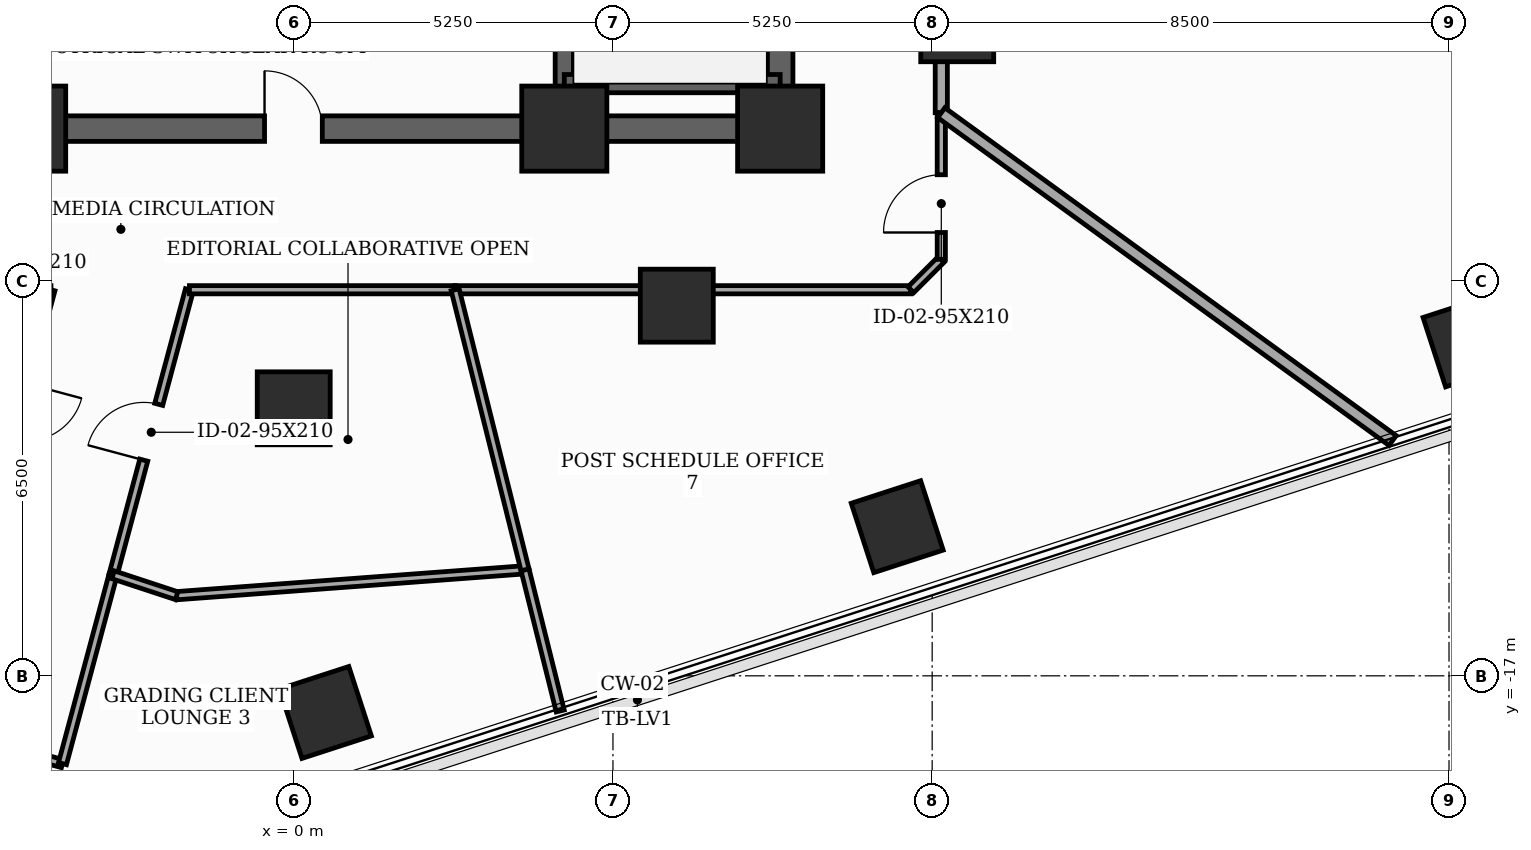
"""IFC4 building model, lengths in metres.
Left out: names, types, materials, properties, quantities, classifications, styles, units other than length and angle.
Written with IfcOpenShell. Run it as: python <this file> out.ifc"""

import sys

from ifc_helpers import new_model, si_unit, direction, frame, frame_2d, origin, origin_2d, place, context, subcontext, project, spatial, rectangle, extrude, element, fill, save


model = new_model("IFC4")
c1 = context("Model", 3, precision=1e-05, world=origin(), true_north=direction((0.0, 1.0)))
c2 = subcontext(c1, "Body", "Model", "MODEL_VIEW")
j1 = project(units=[si_unit("LENGTHUNIT", "METRE"), si_unit("PLANEANGLEUNIT", "RADIAN")], contexts=[c1])
p1 = place(None, origin())
s1 = spatial("IfcSite", under=j1, at=p1, CompositionType="ELEMENT")
p2 = place(p1, origin())
s2 = spatial("IfcBuilding", under=s1, at=p2, CompositionType="ELEMENT")
p3 = place(p2, frame((0.0, 0.0, 90.3)))
s3 = spatial("IfcBuildingStorey", under=s2, at=p3, CompositionType="ELEMENT", Elevation=90.3)
for number, where, z_axis, x_axis in (
    (1, (-4.45, -8.0, 0.0), (0.0, 0.0, 1.0), (1.0, 0.0, 0.0)),
    (2, (4.45, -8.0, 0.0), (0.0, 0.0, 1.0), (1.0, 0.0, 0.0)),
    (3, (8.0, -8.0, 0.0), (0.0, 0.0, 1.0), (1.0, 0.0, 0.0)),
):
    element("IfcColumn", number, at=place(p3, frame(where, z_axis=z_axis, x_axis=x_axis)), inside=s3, PredefinedType="COLUMN", context=c2, shape_type="SweptSolid", body=[
        extrude(rectangle(XDim=1.4, YDim=1.4, at=origin_2d()), origin(), (0.0, 0.0, 1.0), 3.7),
    ])
for number, where, z_axis, x_axis in (
    (4, (0.0, -12.6, 0.0), (0.0, 0.0, 1.0), (1.0, 0.0, 0.0)),
    (5, (6.3, -10.912, 0.0), (0.0, 0.0, 1.0), (1.0, 0.0, 0.0)),
    (6, (10.912, -6.3, 0.0), (0.0, 0.0, 1.0), (1.0, 0.0, 0.0)),
    (7, (0.521, -17.603, 0.0), (0.0, 0.0, 1.0), (0.951, 0.309, 0.0)),
    (8, (9.925, -14.547, 0.0), (0.0, 0.0, 1.0), (0.951, 0.309, 0.0)),
    (9, (19.329, -11.491, 0.0), (0.0, 0.0, 1.0), (0.951, 0.309, 0.0)),
):
    element("IfcColumn", number, at=place(p3, frame(where, z_axis=z_axis, x_axis=x_axis)), inside=s3, PredefinedType="COLUMN", context=c2, shape_type="SweptSolid", body=[
        extrude(rectangle(XDim=1.2, YDim=1.2, at=origin_2d()), origin(), (0.0, 0.0, 1.0), 3.7),
    ])
p4 = place(p3, frame((8.0, -8.0, 0.0), z_axis=(0.0, 0.0, 1.0), x_axis=(0.0, 1.0, 0.0)))
e10 = element("IfcWall", 10, at=p4, inside=s3, PredefinedType="SHEAR", context=c2, shape_type="SweptSolid", body=[
    extrude(rectangle(XDim=16.0, YDim=0.42, at=frame_2d((8.0, 0.0))), origin(), (0.0, 0.0, 1.0), 3.5),
])
p5 = place(p4, frame((9.6, 0.0, 0.0)))
e11 = element("IfcOpeningElement", 11, at=p5, cuts=e10, PredefinedType="OPENING", context=c2, shape_type="SweptSolid", body=[
    extrude(rectangle(XDim=1.05, YDim=2.15, at=frame_2d((0.525, 1.075))), frame((0.0, 0.22, 0.0), z_axis=(0.0, -1.0, 0.0), x_axis=(1.0, 0.0, 0.0)), (0.0, 0.0, 1.0), 0.44),
])
p6 = place(p4, frame((14.229, 0.0, 0.0)))
e12 = element("IfcOpeningElement", 12, at=p6, cuts=e10, PredefinedType="OPENING", context=c2, shape_type="SweptSolid", body=[
    extrude(rectangle(XDim=0.85, YDim=2.02, at=frame_2d((0.425, 1.01))), frame((0.0, 0.22, 0.0), z_axis=(0.0, -1.0, 0.0), x_axis=(1.0, 0.0, 0.0)), (0.0, 0.0, 1.0), 0.44),
])
p7 = place(p3, frame((-8.0, -8.0, 0.0), z_axis=(0.0, 0.0, 1.0), x_axis=(1.0, 0.0, 0.0)))
e13 = element("IfcWall", 13, at=p7, inside=s3, PredefinedType="SHEAR", context=c2, shape_type="SweptSolid", body=[
    extrude(rectangle(XDim=16.0, YDim=0.42, at=frame_2d((8.0, 0.0))), origin(), (0.0, 0.0, 1.0), 3.5),
])
p8 = place(p7, frame((7.52, 0.0, 0.0)))
e14 = element("IfcOpeningElement", 14, at=p8, cuts=e13, PredefinedType="OPENING", context=c2, shape_type="SweptSolid", body=[
    extrude(rectangle(XDim=0.95, YDim=2.1, at=frame_2d((0.475, 1.05))), frame((0.0, 0.22, 0.0), z_axis=(0.0, -1.0, 0.0), x_axis=(1.0, 0.0, 0.0)), (0.0, 0.0, 1.0), 0.44),
])
p9 = place(p3, frame((4.45, -7.79, 0.0), z_axis=(0.0, 0.0, 1.0), x_axis=(0.0, 1.0, 0.0)))
e15 = element("IfcWall", 15, at=p9, inside=s3, PredefinedType="SHEAR", context=c2, shape_type="SweptSolid", body=[
    extrude(rectangle(XDim=15.58, YDim=0.3, at=frame_2d((7.79, 0.0))), origin(), (0.0, 0.0, 1.0), 3.5),
])
p10 = place(p3, frame((4.45, -7.26, 0.0), z_axis=(0.0, 0.0, 1.0), x_axis=(1.0, 0.0, 0.0)))
e16 = element("IfcWall", 16, at=p10, inside=s3, PredefinedType="SHEAR", context=c2, shape_type="SweptSolid", body=[
    extrude(rectangle(XDim=3.55, YDim=0.3, at=frame_2d((1.775, 0.0))), origin(), (0.0, 0.0, 1.0), 3.5),
])
p11 = place(p3, frame((10.65, -7.738, 0.0), z_axis=(0.0, 0.0, 1.0), x_axis=(0.0, 1.0, 0.0)))
e17 = element("IfcWall", 17, at=p11, inside=s3, PredefinedType="SOLIDWALL", context=c2, shape_type="SweptSolid", body=[
    extrude(rectangle(XDim=3.746, YDim=0.2, at=frame_2d((1.873, 0.0))), origin(), (0.0, 0.0, 1.0), 2.785),
])
p12 = place(p3, frame((10.65, -3.992, 0.0), z_axis=(0.0, 0.0, 1.0), x_axis=(0.965906888357, -0.258889712088, 0.0)))
e18 = element("IfcWall", 18, at=p12, inside=s3, PredefinedType="SOLIDWALL", context=c2, shape_type="SweptSolid", body=[
    extrude(rectangle(XDim=11.28, YDim=0.2, at=frame_2d((5.64, 0.0))), origin(), (0.0, 0.0, 1.0), 2.785),
])
p13 = place(p3, frame((-3.992, -10.65, 0.0), z_axis=(0.0, 0.0, 1.0), x_axis=(-0.259046685972, -0.96586480135, 0.0)))
e19 = element("IfcWall", 19, at=p13, inside=s3, PredefinedType="PARTITIONING", context=c2, shape_type="SweptSolid", body=[
    extrude(rectangle(XDim=4.138, YDim=0.135, at=frame_2d((2.069, 0.0))), origin(), (0.0, 0.0, 1.0), 2.785),
])
p14 = place(p13, frame((1.594, 0.0, 0.0)))
e20 = element("IfcOpeningElement", 20, at=p14, cuts=e19, PredefinedType="OPENING", context=c2, shape_type="SweptSolid", body=[
    extrude(rectangle(XDim=0.95, YDim=2.1, at=frame_2d((0.475, 1.05))), frame((0.0, 0.077, 0.0), z_axis=(0.0, -1.0, 0.0), x_axis=(1.0, 0.0, 0.0)), (0.0, 0.0, 1.0), 0.155),
])
p15 = place(p3, frame((-5.928, -17.875, 0.0), z_axis=(0.0, 0.0, 1.0), x_axis=(0.965959937537, -0.258691706618, 0.0)))
e21 = element("IfcWall", 21, at=p15, inside=s3, PredefinedType="PARTITIONING", context=c2, shape_type="SweptSolid", body=[
    extrude(rectangle(XDim=2.2, YDim=0.135, at=frame_2d((1.1, 0.0))), origin(), (0.0, 0.0, 1.0), 3.5),
])
p16 = place(p3, frame((-3.803, -18.444, 0.0), z_axis=(0.0, 0.0, 1.0), x_axis=(0.258739880159, 0.965947034995, 0.0)))
e22 = element("IfcWall", 22, at=p16, inside=s3, PredefinedType="PARTITIONING", context=c2, shape_type="SweptSolid", body=[
    extrude(rectangle(XDim=3.216, YDim=0.135, at=frame_2d((1.608, 0.0))), origin(), (0.0, 0.0, 1.0), 3.125),
])
p17 = place(p3, frame((-2.971, -15.338, 0.0), z_axis=(0.0, 0.0, 1.0), x_axis=(0.258764582319, 0.965940417902, 0.0)))
e23 = element("IfcWall", 23, at=p17, inside=s3, PredefinedType="PARTITIONING", context=c2, shape_type="SweptSolid", body=[
    extrude(rectangle(XDim=4.853, YDim=0.135, at=frame_2d((2.427, 0.0))), origin(), (0.0, 0.0, 1.0), 2.785),
])
p18 = place(p17, frame((1.952, 0.0, 0.0)))
e24 = element("IfcOpeningElement", 24, at=p18, cuts=e23, PredefinedType="OPENING", context=c2, shape_type="SweptSolid", body=[
    extrude(rectangle(XDim=0.95, YDim=2.1, at=frame_2d((0.475, 1.05))), frame((0.0, 0.077, 0.0), z_axis=(0.0, -1.0, 0.0), x_axis=(1.0, 0.0, 0.0)), (0.0, 0.0, 1.0), 0.155),
])
p19 = place(p3, frame((-1.715, -10.65, 0.0), z_axis=(0.0, 0.0, 1.0), x_axis=(1.0, 0.0, 0.0)))
e25 = element("IfcWall", 25, at=p19, inside=s3, PredefinedType="PARTITIONING", context=c2, shape_type="SweptSolid", body=[
    extrude(rectangle(XDim=4.37, YDim=0.135, at=frame_2d((2.185, 0.0))), origin(), (0.0, 0.0, 1.0), 2.785),
])
p20 = place(p3, frame((2.655, -10.65, 0.0), z_axis=(0.0, 0.0, 1.0), x_axis=(1.0, 0.0, 0.0)))
e26 = element("IfcWall", 26, at=p20, inside=s3, PredefinedType="PARTITIONING", context=c2, shape_type="SweptSolid", body=[
    extrude(rectangle(XDim=7.495, YDim=0.135, at=frame_2d((3.748, 0.0))), origin(), (0.0, 0.0, 1.0), 2.785),
])
p21 = place(p3, frame((10.15, -10.65, 0.0), z_axis=(0.0, 0.0, 1.0), x_axis=(0.707106781187, 0.707106781187, 0.0)))
e27 = element("IfcWall", 27, at=p21, inside=s3, PredefinedType="PARTITIONING", context=c2, shape_type="SweptSolid", body=[
    extrude(rectangle(XDim=0.707, YDim=0.135, at=frame_2d((0.354, 0.0))), origin(), (0.0, 0.0, 1.0), 3.5),
])
p22 = place(p3, frame((10.65, -10.15, 0.0), z_axis=(0.0, 0.0, 1.0), x_axis=(0.0, 1.0, 0.0)))
e28 = element("IfcWall", 28, at=p22, inside=s3, PredefinedType="PARTITIONING", context=c2, shape_type="SweptSolid", body=[
    extrude(rectangle(XDim=2.412, YDim=0.135, at=frame_2d((1.206, 0.0))), origin(), (0.0, 0.0, 1.0), 3.5),
])
p23 = place(p22, frame((0.442, 0.0, 0.0)))
e29 = element("IfcOpeningElement", 29, at=p23, cuts=e28, PredefinedType="OPENING", context=c2, shape_type="SweptSolid", body=[
    extrude(rectangle(XDim=0.95, YDim=2.1, at=frame_2d((0.475, 1.05))), frame((0.0, 0.077, 0.0), z_axis=(0.0, -1.0, 0.0), x_axis=(1.0, 0.0, 0.0)), (0.0, 0.0, 1.0), 0.155),
])
p24 = place(p3, frame((10.65, -7.738, 0.0), z_axis=(0.0, 0.0, 1.0), x_axis=(0.809037487075, -0.587757045477, 0.0)))
e30 = element("IfcWall", 30, at=p24, inside=s3, PredefinedType="SOLIDWALL", context=c2, shape_type="SweptSolid", body=[
    extrude(rectangle(XDim=9.174, YDim=0.2, at=frame_2d((4.587, 0.0))), origin(), (0.0, 0.0, 1.0), 2.935),
])
p25 = place(p3, frame((3.804, -15.256, 0.0), z_axis=(0.0, 0.0, 1.0), x_axis=(-0.99725056907, -0.07410332307, 0.0)))
e31 = element("IfcWall", 31, at=p25, inside=s3, PredefinedType="PARTITIONING", context=c2, shape_type="SweptSolid", body=[
    extrude(rectangle(XDim=5.746, YDim=0.135, at=frame_2d((2.873, 0.0))), origin(), (0.0, 0.0, 1.0), 2.785),
])
p26 = place(p3, frame((-1.926, -15.682, 0.0), z_axis=(0.0, 0.0, 1.0), x_axis=(-0.949852955326, 0.312696919171, 0.0)))
e32 = element("IfcWall", 32, at=p26, inside=s3, PredefinedType="PARTITIONING", context=c2, shape_type="SweptSolid", body=[
    extrude(rectangle(XDim=1.1, YDim=0.135, at=frame_2d((0.55, 0.0))), origin(), (0.0, 0.0, 1.0), 3.125),
])
p27 = place(p3, frame((4.383, -17.578, 0.0), z_axis=(0.0, 0.0, 1.0), x_axis=(-0.241887449135, 0.970304314095, 0.0)))
e33 = element("IfcWall", 33, at=p27, inside=s3, PredefinedType="PARTITIONING", context=c2, shape_type="SweptSolid", body=[
    extrude(rectangle(XDim=2.393, YDim=0.135, at=frame_2d((1.197, 0.0))), origin(), (0.0, 0.0, 1.0), 2.935),
])
p28 = place(p3, frame((3.804, -15.256, 0.0), z_axis=(0.0, 0.0, 1.0), x_axis=(-0.24201527033, 0.970272440569, 0.0)))
e34 = element("IfcWall", 34, at=p28, inside=s3, PredefinedType="PARTITIONING", context=c2, shape_type="SweptSolid", body=[
    extrude(rectangle(XDim=4.747, YDim=0.135, at=frame_2d((2.374, 0.0))), origin(), (0.0, 0.0, 1.0), 2.785),
])
p29 = place(p8, origin())
e35 = element("IfcDoor", 35, at=p29, inside=s3, OperationType="SINGLE_SWING_LEFT", PredefinedType="DOOR", context=c2, shape_type="SweptSolid", body=[
    extrude(rectangle(XDim=0.95, YDim=2.1, at=frame_2d((0.475, 1.05))), frame((0.0, 0.025, 0.0), z_axis=(0.0, -1.0, 0.0), x_axis=(1.0, 0.0, 0.0)), (0.0, 0.0, 1.0), 0.05),
])
fill(e14, e35)
p30 = place(p18, origin())
e36 = element("IfcDoor", 36, at=p30, inside=s3, OperationType="SINGLE_SWING_LEFT", PredefinedType="DOOR", context=c2, shape_type="SweptSolid", body=[
    extrude(rectangle(XDim=0.95, YDim=2.1, at=frame_2d((0.475, 1.05))), frame((0.0, 0.025, 0.0), z_axis=(0.0, -1.0, 0.0), x_axis=(1.0, 0.0, 0.0)), (0.0, 0.0, 1.0), 0.05),
])
fill(e24, e36)
p31 = place(p23, origin())
e37 = element("IfcDoor", 37, at=p31, inside=s3, OperationType="SINGLE_SWING_LEFT", PredefinedType="DOOR", context=c2, shape_type="SweptSolid", body=[
    extrude(rectangle(XDim=0.95, YDim=2.1, at=frame_2d((0.475, 1.05))), frame((0.0, 0.025, 0.0), z_axis=(0.0, -1.0, 0.0), x_axis=(1.0, 0.0, 0.0)), (0.0, 0.0, 1.0), 0.05),
])
fill(e29, e37)
save(model, sys.argv[1])
